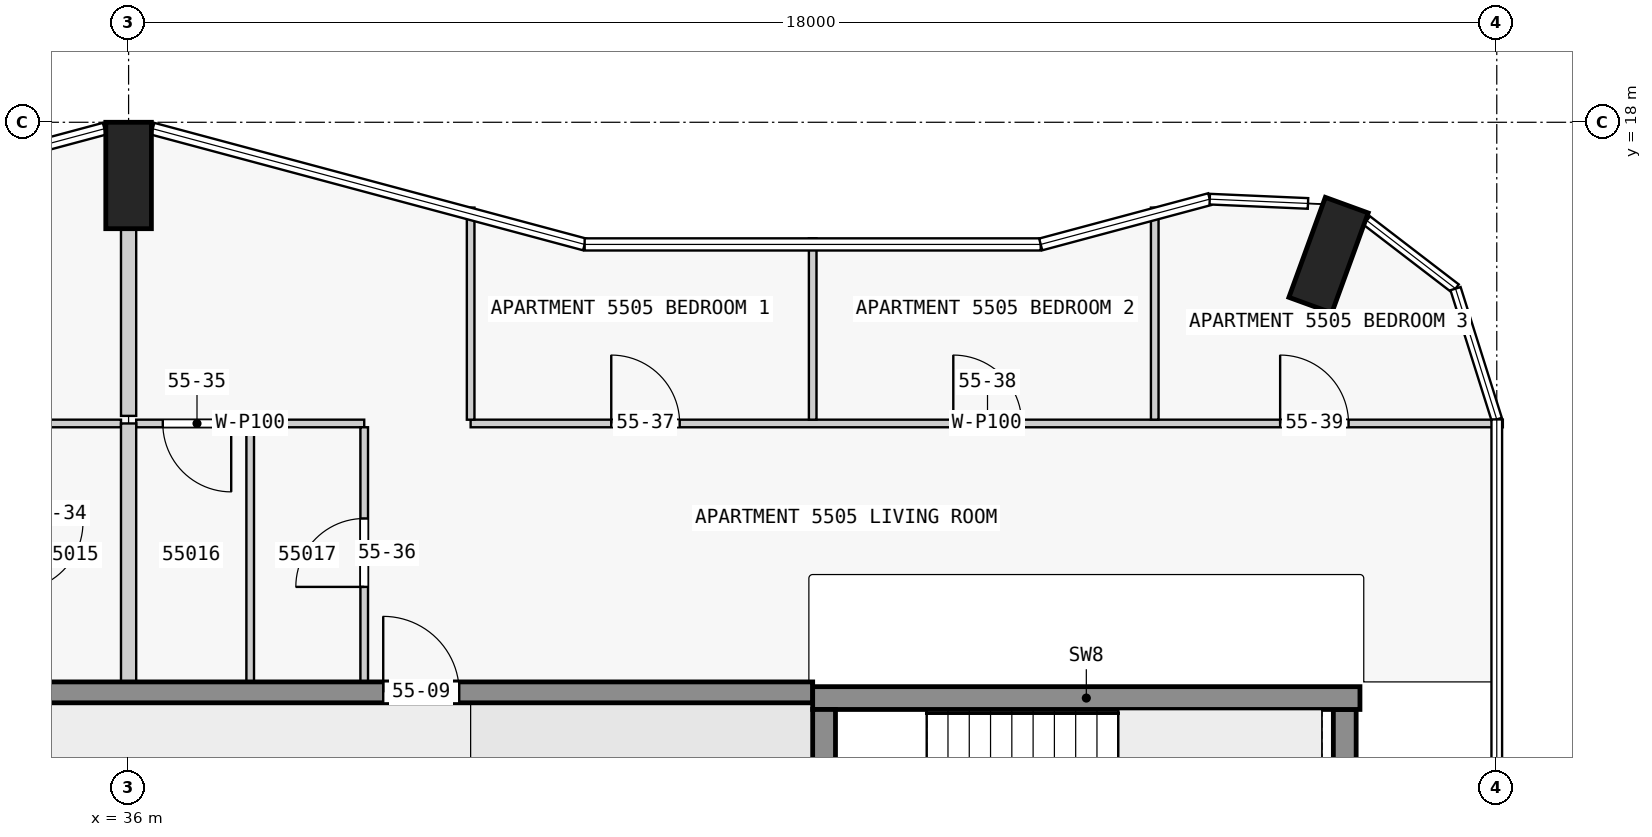
"""IFC4 building model, lengths in metres.
Left out: names, types, materials, properties, quantities, classifications, styles, units other than length and angle.
Written with IfcOpenShell. Run it as: python <this file> out.ifc"""

import sys

from ifc_helpers import new_model, si_unit, direction, frame, frame_2d, origin, origin_2d, place, context, subcontext, project, spatial, rectangle, extrude, element, fill, save


model = new_model("IFC4")
c1 = context("Model", 3, precision=1e-05, world=origin(), true_north=direction((0.0, 1.0)))
c2 = subcontext(c1, "Body", "Model", "MODEL_VIEW")
j1 = project(units=[si_unit("LENGTHUNIT", "METRE"), si_unit("PLANEANGLEUNIT", "RADIAN")], contexts=[c1])
p1 = place(None, origin())
s1 = spatial("IfcSite", under=j1, at=p1, CompositionType="ELEMENT")
p2 = place(p1, origin())
s2 = spatial("IfcBuilding", under=s1, at=p2, CompositionType="ELEMENT")
p3 = place(p2, frame((0.0, 0.0, 211.9)))
s3 = spatial("IfcBuildingStorey", under=s2, at=p3, CompositionType="ELEMENT", Elevation=211.9)
for number, where, z_axis, x_axis in (
    (1, (51.787, 16.252, 0.0), (0.0, 0.0, 1.0), (-0.94, 0.342, 0.0)),
    (2, (36.0, 17.3, 0.0), (0.0, 0.0, 1.0), (1.0, 0.0, 0.0)),
):
    element("IfcColumn", number, at=place(p3, frame(where, z_axis=z_axis, x_axis=x_axis)), inside=s3, PredefinedType="COLUMN", context=c2, shape_type="SweptSolid", body=[
        extrude(rectangle(XDim=0.6, YDim=1.4, at=origin_2d()), origin(), (0.0, 0.0, 1.0), 3.5),
    ])
p4 = place(p3, frame((45.15, 7.725, 0.0), z_axis=(0.0, 0.0, 1.0), x_axis=(0.0, 1.0, 0.0)))
e3 = element("IfcWall", 3, at=p4, inside=s3, PredefinedType="SHEAR", context=c2, shape_type="SweptSolid", body=[
    extrude(rectangle(XDim=2.55, YDim=0.3, at=frame_2d((1.275, 0.0))), origin(), (0.0, 0.0, 1.0), 3.5),
])
p5 = place(p4, frame((0.725, 0.0, 0.0)))
e4 = element("IfcOpeningElement", 4, at=p5, cuts=e3, PredefinedType="OPENING", context=c2, shape_type="SweptSolid", body=[
    extrude(rectangle(XDim=1.1, YDim=2.1, at=frame_2d((0.55, 1.05))), frame((0.0, 0.16, 0.0), z_axis=(0.0, -1.0, 0.0), x_axis=(1.0, 0.0, 0.0)), (0.0, 0.0, 1.0), 0.32),
])
p6 = place(p3, frame((52.0, 7.725, 0.0), z_axis=(0.0, 0.0, 1.0), x_axis=(0.0, 1.0, 0.0)))
e5 = element("IfcWall", 5, at=p6, inside=s3, PredefinedType="SHEAR", context=c2, shape_type="SweptSolid", body=[
    extrude(rectangle(XDim=2.55, YDim=0.3, at=frame_2d((1.275, 0.0))), origin(), (0.0, 0.0, 1.0), 3.5),
])
p7 = place(p3, frame((45.0, 10.425, 0.0), z_axis=(0.0, 0.0, 1.0), x_axis=(1.0, 0.0, 0.0)))
e6 = element("IfcWall", 6, at=p7, inside=s3, PredefinedType="SHEAR", context=c2, shape_type="SweptSolid", body=[
    extrude(rectangle(XDim=7.2, YDim=0.3, at=frame_2d((3.6, 0.0))), origin(), (0.0, 0.0, 1.0), 3.5),
])
p8 = place(p3, frame((22.5, 10.5, 0.0), z_axis=(0.0, 0.0, 1.0), x_axis=(1.0, 0.0, 0.0)))
e7 = element("IfcWall", 7, at=p8, inside=s3, PredefinedType="SHEAR", context=c2, shape_type="SweptSolid", body=[
    extrude(rectangle(XDim=22.5, YDim=0.275, at=frame_2d((11.25, 0.0))), origin(), (0.0, 0.0, 1.0), 3.25),
])
p9 = place(p8, frame((1.75, 0.0, 0.0)))
e8 = element("IfcOpeningElement", 8, at=p9, cuts=e7, PredefinedType="OPENING", context=c2, shape_type="SweptSolid", body=[
    extrude(rectangle(XDim=1.0, YDim=2.1, at=frame_2d((0.5, 1.05))), frame((0.0, 0.147, 0.0), z_axis=(0.0, -1.0, 0.0), x_axis=(1.0, 0.0, 0.0)), (0.0, 0.0, 1.0), 0.295),
])
p10 = place(p8, frame((5.85, 0.0, 0.0)))
e9 = element("IfcOpeningElement", 9, at=p10, cuts=e7, PredefinedType="OPENING", context=c2, shape_type="SweptSolid", body=[
    extrude(rectangle(XDim=1.8, YDim=2.1, at=frame_2d((0.9, 1.05))), frame((0.0, 0.147, 0.0), z_axis=(0.0, -1.0, 0.0), x_axis=(1.0, 0.0, 0.0)), (0.0, 0.0, 1.0), 0.295),
])
p11 = place(p8, frame((10.75, 0.0, 0.0)))
e10 = element("IfcOpeningElement", 10, at=p11, cuts=e7, PredefinedType="OPENING", context=c2, shape_type="SweptSolid", body=[
    extrude(rectangle(XDim=1.0, YDim=2.1, at=frame_2d((0.5, 1.05))), frame((0.0, 0.147, 0.0), z_axis=(0.0, -1.0, 0.0), x_axis=(1.0, 0.0, 0.0)), (0.0, 0.0, 1.0), 0.295),
])
p12 = place(p8, frame((16.85, 0.0, 0.0)))
e11 = element("IfcOpeningElement", 11, at=p12, cuts=e7, PredefinedType="OPENING", context=c2, shape_type="SweptSolid", body=[
    extrude(rectangle(XDim=1.0, YDim=2.1, at=frame_2d((0.5, 1.05))), frame((0.0, 0.147, 0.0), z_axis=(0.0, -1.0, 0.0), x_axis=(1.0, 0.0, 0.0)), (0.0, 0.0, 1.0), 0.295),
])
p13 = place(p3, frame((35.9, 14.038, 0.0), z_axis=(0.0, 0.0, 1.0), x_axis=(-1.0, 0.0, 0.0)))
e12 = element("IfcWall", 12, at=p13, inside=s3, PredefinedType="PARTITIONING", context=c2, shape_type="SweptSolid", body=[
    extrude(rectangle(XDim=1.4, YDim=0.1, at=frame_2d((0.7, 0.0))), origin(), (0.0, 0.0, 1.0), 3.25),
])
p14 = place(p3, frame((39.1, 14.038, 0.0), z_axis=(0.0, 0.0, 1.0), x_axis=(-1.0, 0.0, 0.0)))
e13 = element("IfcWall", 13, at=p14, inside=s3, PredefinedType="PARTITIONING", context=c2, shape_type="SweptSolid", body=[
    extrude(rectangle(XDim=3.0, YDim=0.1, at=frame_2d((1.5, 0.0))), origin(), (0.0, 0.0, 1.0), 3.25),
])
p15 = place(p14, frame((1.75, 0.0, 0.0)))
e14 = element("IfcOpeningElement", 14, at=p15, cuts=e13, PredefinedType="OPENING", context=c2, shape_type="SweptSolid", body=[
    extrude(rectangle(XDim=0.9, YDim=2.1, at=frame_2d((0.45, 1.05))), frame((0.0, 0.06, 0.0), z_axis=(0.0, -1.0, 0.0), x_axis=(1.0, 0.0, 0.0)), (0.0, 0.0, 1.0), 0.12),
])
p16 = place(p3, frame((40.5, 14.038, 0.0), z_axis=(0.0, 0.0, 1.0), x_axis=(1.0, 0.0, 0.0)))
e15 = element("IfcWall", 15, at=p16, inside=s3, PredefinedType="PARTITIONING", context=c2, shape_type="SweptSolid", body=[
    extrude(rectangle(XDim=13.58, YDim=0.1, at=frame_2d((6.79, 0.0))), origin(), (0.0, 0.0, 1.0), 3.25),
])
p17 = place(p16, frame((1.85, 0.0, 0.0)))
e16 = element("IfcOpeningElement", 16, at=p17, cuts=e15, PredefinedType="OPENING", context=c2, shape_type="SweptSolid", body=[
    extrude(rectangle(XDim=0.9, YDim=2.1, at=frame_2d((0.45, 1.05))), frame((0.0, 0.06, 0.0), z_axis=(0.0, -1.0, 0.0), x_axis=(1.0, 0.0, 0.0)), (0.0, 0.0, 1.0), 0.12),
])
p18 = place(p16, frame((6.35, 0.0, 0.0)))
e17 = element("IfcOpeningElement", 17, at=p18, cuts=e15, PredefinedType="OPENING", context=c2, shape_type="SweptSolid", body=[
    extrude(rectangle(XDim=0.9, YDim=2.1, at=frame_2d((0.45, 1.05))), frame((0.0, 0.06, 0.0), z_axis=(0.0, -1.0, 0.0), x_axis=(1.0, 0.0, 0.0)), (0.0, 0.0, 1.0), 0.12),
])
p19 = place(p16, frame((10.65, 0.0, 0.0)))
e18 = element("IfcOpeningElement", 18, at=p19, cuts=e15, PredefinedType="OPENING", context=c2, shape_type="SweptSolid", body=[
    extrude(rectangle(XDim=0.9, YDim=2.1, at=frame_2d((0.45, 1.05))), frame((0.0, 0.06, 0.0), z_axis=(0.0, -1.0, 0.0), x_axis=(1.0, 0.0, 0.0)), (0.0, 0.0, 1.0), 0.12),
])
p20 = place(p3, frame((36.0, 16.6, 0.0), z_axis=(0.0, 0.0, 1.0), x_axis=(0.0, -1.0, 0.0)))
e19 = element("IfcWall", 19, at=p20, inside=s3, PredefinedType="PARTITIONING", context=c2, shape_type="SweptSolid", body=[
    extrude(rectangle(XDim=2.463, YDim=0.2, at=frame_2d((1.231, 0.0))), origin(), (0.0, 0.0, 1.0), 3.25),
])
p21 = place(p3, frame((36.0, 10.637, 0.0), z_axis=(0.0, 0.0, 1.0), x_axis=(0.0, 1.0, 0.0)))
e20 = element("IfcWall", 20, at=p21, inside=s3, PredefinedType="PARTITIONING", context=c2, shape_type="SweptSolid", body=[
    extrude(rectangle(XDim=3.4, YDim=0.2, at=frame_2d((1.7, 0.0))), origin(), (0.0, 0.0, 1.0), 3.25),
])
p22 = place(p3, frame((37.6, 10.637, 0.0), z_axis=(0.0, 0.0, 1.0), x_axis=(0.0, 1.0, 0.0)))
e21 = element("IfcWall", 21, at=p22, inside=s3, PredefinedType="PARTITIONING", context=c2, shape_type="SweptSolid", body=[
    extrude(rectangle(XDim=3.35, YDim=0.1, at=frame_2d((1.675, 0.0))), origin(), (0.0, 0.0, 1.0), 3.25),
])
p23 = place(p3, frame((39.1, 10.637, 0.0), z_axis=(0.0, 0.0, 1.0), x_axis=(0.0, 1.0, 0.0)))
e22 = element("IfcWall", 22, at=p23, inside=s3, PredefinedType="PARTITIONING", context=c2, shape_type="SweptSolid", body=[
    extrude(rectangle(XDim=3.35, YDim=0.1, at=frame_2d((1.675, 0.0))), origin(), (0.0, 0.0, 1.0), 3.25),
])
p24 = place(p23, frame((1.25, 0.0, 0.0)))
e23 = element("IfcOpeningElement", 23, at=p24, cuts=e22, PredefinedType="OPENING", context=c2, shape_type="SweptSolid", body=[
    extrude(rectangle(XDim=0.9, YDim=2.1, at=frame_2d((0.45, 1.05))), frame((0.0, 0.06, 0.0), z_axis=(0.0, -1.0, 0.0), x_axis=(1.0, 0.0, 0.0)), (0.0, 0.0, 1.0), 0.12),
])
p25 = place(p3, frame((40.5, 16.878, 0.0), z_axis=(0.0, 0.0, 1.0), x_axis=(0.0, -1.0, 0.0)))
e24 = element("IfcWall", 24, at=p25, inside=s3, PredefinedType="PARTITIONING", context=c2, shape_type="SweptSolid", body=[
    extrude(rectangle(XDim=2.79, YDim=0.1, at=frame_2d((1.395, 0.0))), origin(), (0.0, 0.0, 1.0), 3.25),
])
p26 = place(p3, frame((45.0, 14.087, 0.0), z_axis=(0.0, 0.0, 1.0), x_axis=(0.0, 1.0, 0.0)))
e25 = element("IfcWall", 25, at=p26, inside=s3, PredefinedType="PARTITIONING", context=c2, shape_type="SweptSolid", body=[
    extrude(rectangle(XDim=2.386, YDim=0.1, at=frame_2d((1.193, 0.0))), origin(), (0.0, 0.0, 1.0), 3.25),
])
p27 = place(p3, frame((49.5, 14.087, 0.0), z_axis=(0.0, 0.0, 1.0), x_axis=(0.0, 1.0, 0.0)))
e26 = element("IfcWall", 26, at=p27, inside=s3, PredefinedType="PARTITIONING", context=c2, shape_type="SweptSolid", body=[
    extrude(rectangle(XDim=2.79, YDim=0.1, at=frame_2d((1.395, 0.0))), origin(), (0.0, 0.0, 1.0), 3.25),
])
p28 = place(p12, origin())
e27 = element("IfcDoor", 27, at=p28, inside=s3, OperationType="SINGLE_SWING_RIGHT", PredefinedType="DOOR", context=c2, shape_type="SweptSolid", body=[
    extrude(rectangle(XDim=1.0, YDim=2.1, at=frame_2d((0.5, 1.05))), frame((0.0, 0.025, 0.0), z_axis=(0.0, -1.0, 0.0), x_axis=(1.0, 0.0, 0.0)), (0.0, 0.0, 1.0), 0.05),
])
fill(e11, e27)
p29 = place(p15, origin())
e28 = element("IfcDoor", 28, at=p29, inside=s3, OperationType="SINGLE_SWING_RIGHT", PredefinedType="DOOR", context=c2, shape_type="SweptSolid", body=[
    extrude(rectangle(XDim=0.9, YDim=2.1, at=frame_2d((0.45, 1.05))), frame((0.0, 0.025, 0.0), z_axis=(0.0, -1.0, 0.0), x_axis=(1.0, 0.0, 0.0)), (0.0, 0.0, 1.0), 0.05),
])
fill(e14, e28)
p30 = place(p24, origin())
e29 = element("IfcDoor", 29, at=p30, inside=s3, OperationType="SINGLE_SWING_RIGHT", PredefinedType="DOOR", context=c2, shape_type="SweptSolid", body=[
    extrude(rectangle(XDim=0.9, YDim=2.1, at=frame_2d((0.45, 1.05))), frame((0.0, 0.025, 0.0), z_axis=(0.0, -1.0, 0.0), x_axis=(1.0, 0.0, 0.0)), (0.0, 0.0, 1.0), 0.05),
])
fill(e23, e29)
p31 = place(p17, origin())
e30 = element("IfcDoor", 30, at=p31, inside=s3, OperationType="SINGLE_SWING_LEFT", PredefinedType="DOOR", context=c2, shape_type="SweptSolid", body=[
    extrude(rectangle(XDim=0.9, YDim=2.1, at=frame_2d((0.45, 1.05))), frame((0.0, 0.025, 0.0), z_axis=(0.0, -1.0, 0.0), x_axis=(1.0, 0.0, 0.0)), (0.0, 0.0, 1.0), 0.05),
])
fill(e16, e30)
p32 = place(p18, origin())
e31 = element("IfcDoor", 31, at=p32, inside=s3, OperationType="SINGLE_SWING_RIGHT", PredefinedType="DOOR", context=c2, shape_type="SweptSolid", body=[
    extrude(rectangle(XDim=0.9, YDim=2.1, at=frame_2d((0.45, 1.05))), frame((0.0, 0.025, 0.0), z_axis=(0.0, -1.0, 0.0), x_axis=(1.0, 0.0, 0.0)), (0.0, 0.0, 1.0), 0.05),
])
fill(e17, e31)
p33 = place(p19, origin())
e32 = element("IfcDoor", 32, at=p33, inside=s3, OperationType="SINGLE_SWING_RIGHT", PredefinedType="DOOR", context=c2, shape_type="SweptSolid", body=[
    extrude(rectangle(XDim=0.9, YDim=2.1, at=frame_2d((0.45, 1.05))), frame((0.0, 0.025, 0.0), z_axis=(0.0, -1.0, 0.0), x_axis=(1.0, 0.0, 0.0)), (0.0, 0.0, 1.0), 0.05),
])
fill(e18, e32)
save(model, sys.argv[1])
